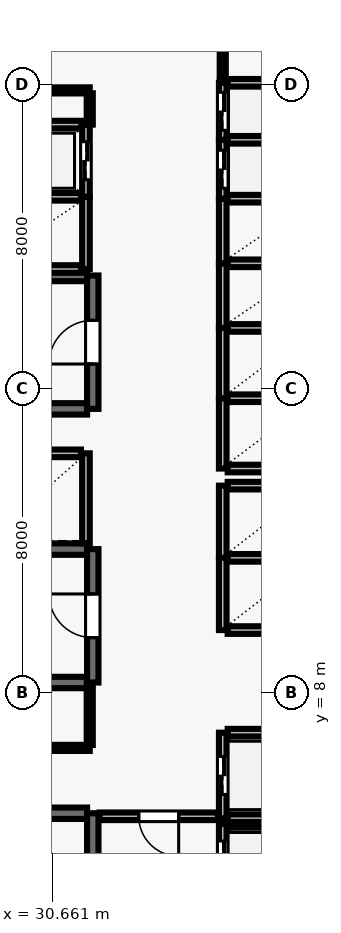
"""IFC4 building model, lengths in metres.
Left out: names, types, materials, properties, quantities, classifications, styles, units other than length and angle.
Written with IfcOpenShell. Run it as: python <this file> out.ifc"""

import sys

from ifc_helpers import new_model, si_unit, direction, frame, frame_2d, origin, place, context, subcontext, project, spatial, rectangle, extrude, element, fill, save


model = new_model("IFC4")
c1 = context("Model", 3, precision=1e-05, world=origin(), true_north=direction((0.0, 1.0)))
c2 = subcontext(c1, "Body", "Model", "MODEL_VIEW")
j1 = project(units=[si_unit("LENGTHUNIT", "METRE"), si_unit("PLANEANGLEUNIT", "RADIAN")], contexts=[c1])
p1 = place(None, origin())
s1 = spatial("IfcSite", under=j1, at=p1, CompositionType="ELEMENT")
p2 = place(p1, origin())
s2 = spatial("IfcBuilding", under=s1, at=p2, CompositionType="ELEMENT")
p3 = place(p2, frame((0.0, 0.0, 10.4)))
s3 = spatial("IfcBuildingStorey", under=s2, at=p3, CompositionType="ELEMENT", Elevation=10.4)
p4 = place(p3, frame((31.58, 4.83, 0.0), z_axis=(0.0, 0.0, 1.0), x_axis=(-1.0, 0.0, 0.0)))
e1 = element("IfcWall", 1, at=p4, inside=s3, PredefinedType="SHEAR", context=c2, shape_type="SweptSolid", body=[
    extrude(rectangle(XDim=8.36, YDim=0.3, at=frame_2d((4.18, 0.0))), origin(), (0.0, 0.0, 1.0), 4.92),
])
p5 = place(p3, frame((31.73, 0.96, 0.0), z_axis=(0.0, 0.0, 1.0), x_axis=(0.0, 1.0, 0.0)))
e2 = element("IfcWall", 2, at=p5, inside=s3, PredefinedType="SHEAR", context=c2, shape_type="SweptSolid", body=[
    extrude(rectangle(XDim=3.87, YDim=0.3, at=frame_2d((1.935, 0.0))), origin(), (0.0, 0.0, 1.0), 4.92),
])
p6 = place(p5, frame((1.54, 0.0, 0.0)))
e3 = element("IfcOpeningElement", 3, at=p6, cuts=e2, PredefinedType="OPENING", context=c2, shape_type="SweptSolid", body=[
    extrude(rectangle(XDim=1.15, YDim=2.15, at=frame_2d((0.575, 1.075))), frame((0.0, 0.16, 0.0), z_axis=(0.0, -1.0, 0.0), x_axis=(1.0, 0.0, 0.0)), (0.0, 0.0, 1.0), 0.32),
])
for number, where, z_axis, x_axis in (
    (4, (31.58, 18.98, 0.0), (0.0, 0.0, 1.0), (-1.0, 0.0, 0.0)),
    (5, (23.22, 15.47, 0.0), (0.0, 0.0, 1.0), (1.0, 0.0, 0.0)),
):
    element("IfcWall", number, at=place(p3, frame(where, z_axis=z_axis, x_axis=x_axis)), inside=s3, PredefinedType="SHEAR", context=c2, shape_type="SweptSolid", body=[
        extrude(rectangle(XDim=8.36, YDim=0.3, at=frame_2d((4.18, 0.0))), origin(), (0.0, 0.0, 1.0), 4.92),
    ])
p7 = place(p3, frame((31.73, 15.47, 0.0), z_axis=(0.0, 0.0, 1.0), x_axis=(0.0, 1.0, 0.0)))
e6 = element("IfcWall", 6, at=p7, inside=s3, PredefinedType="SHEAR", context=c2, shape_type="SweptSolid", body=[
    extrude(rectangle(XDim=3.51, YDim=0.3, at=frame_2d((1.755, 0.0))), origin(), (0.0, 0.0, 1.0), 4.92),
])
p8 = place(p7, frame((1.18, 0.0, 0.0)))
e7 = element("IfcOpeningElement", 7, at=p8, cuts=e6, PredefinedType="OPENING", context=c2, shape_type="SweptSolid", body=[
    extrude(rectangle(XDim=1.15, YDim=2.15, at=frame_2d((0.575, 1.075))), frame((0.0, 0.16, 0.0), z_axis=(0.0, -1.0, 0.0), x_axis=(1.0, 0.0, 0.0)), (0.0, 0.0, 1.0), 0.32),
])
for number, where, z_axis, x_axis in (
    (8, (31.58, 11.78, 0.0), (0.0, 0.0, 1.0), (-1.0, 0.0, 0.0)),
    (9, (23.22, 8.27, 0.0), (0.0, 0.0, 1.0), (1.0, 0.0, 0.0)),
):
    element("IfcWall", number, at=place(p3, frame(where, z_axis=z_axis, x_axis=x_axis)), inside=s3, PredefinedType="SHEAR", context=c2, shape_type="SweptSolid", body=[
        extrude(rectangle(XDim=8.36, YDim=0.3, at=frame_2d((4.18, 0.0))), origin(), (0.0, 0.0, 1.0), 4.92),
    ])
p9 = place(p3, frame((31.73, 8.27, 0.0), z_axis=(0.0, 0.0, 1.0), x_axis=(0.0, 1.0, 0.0)))
e10 = element("IfcWall", 10, at=p9, inside=s3, PredefinedType="SHEAR", context=c2, shape_type="SweptSolid", body=[
    extrude(rectangle(XDim=3.51, YDim=0.3, at=frame_2d((1.755, 0.0))), origin(), (0.0, 0.0, 1.0), 4.92),
])
p10 = place(p9, frame((1.18, 0.0, 0.0)))
e11 = element("IfcOpeningElement", 11, at=p10, cuts=e10, PredefinedType="OPENING", context=c2, shape_type="SweptSolid", body=[
    extrude(rectangle(XDim=1.15, YDim=2.15, at=frame_2d((0.575, 1.075))), frame((0.0, 0.16, 0.0), z_axis=(0.0, -1.0, 0.0), x_axis=(1.0, 0.0, 0.0)), (0.0, 0.0, 1.0), 0.32),
])
p11 = place(p3, frame((35.15, 4.55, 0.0), z_axis=(0.0, 0.0, 1.0), x_axis=(0.0, -1.0, 0.0)))
e12 = element("IfcWall", 12, at=p11, inside=s3, PredefinedType="SOLIDWALL", context=c2, shape_type="SweptSolid", body=[
    extrude(rectangle(XDim=2.1, YDim=0.2, at=frame_2d((1.05, 0.0))), origin(), (0.0, 0.0, 1.0), 4.92),
])
p12 = place(p11, frame((0.45, 0.0, 0.0)))
e13 = element("IfcOpeningElement", 13, at=p12, cuts=e12, PredefinedType="OPENING", context=c2, shape_type="SweptSolid", body=[
    extrude(rectangle(XDim=1.2, YDim=2.15, at=frame_2d((0.6, 1.075))), frame((0.0, 0.11, 0.0), z_axis=(0.0, -1.0, 0.0), x_axis=(1.0, 0.0, 0.0)), (0.0, 0.0, 1.0), 0.22),
])
p13 = place(p3, frame((37.42, 4.55, 0.0), z_axis=(0.0, 0.0, 1.0), x_axis=(-1.0, 0.0, 0.0)))
e14 = element("IfcWall", 14, at=p13, inside=s3, PredefinedType="SOLIDWALL", context=c2, shape_type="SweptSolid", body=[
    extrude(rectangle(XDim=2.14, YDim=0.2, at=frame_2d((1.07, 0.0))), origin(), (0.0, 0.0, 1.0), 4.92),
])
p14 = place(p3, frame((35.15, 6.95, 0.0), z_axis=(0.0, 0.0, 1.0), x_axis=(0.0, -1.0, 0.0)))
e15 = element("IfcWall", 15, at=p14, inside=s3, PredefinedType="SOLIDWALL", context=c2, shape_type="SweptSolid", body=[
    extrude(rectangle(XDim=2.25, YDim=0.2, at=frame_2d((1.125, 0.0))), origin(), (0.0, 0.0, 1.0), 4.92),
])
p15 = place(p14, frame((0.625, 0.0, 0.0)))
e16 = element("IfcOpeningElement", 16, at=p15, cuts=e15, PredefinedType="OPENING", context=c2, shape_type="SweptSolid", body=[
    extrude(rectangle(XDim=1.0, YDim=2.1, at=frame_2d((0.5, 1.05))), frame((0.0, 0.11, 0.0), z_axis=(0.0, -1.0, 0.0), x_axis=(1.0, 0.0, 0.0)), (0.0, 0.0, 1.0), 0.22),
])
for number, where, z_axis, x_axis in (
    (17, (35.28, 4.7, 0.0), (0.0, 0.0, 1.0), (1.0, 0.0, 0.0)),
    (18, (37.42, 6.95, 0.0), (0.0, 0.0, 1.0), (-1.0, 0.0, 0.0)),
):
    element("IfcWall", number, at=place(p3, frame(where, z_axis=z_axis, x_axis=x_axis)), inside=s3, PredefinedType="SOLIDWALL", context=c2, shape_type="SweptSolid", body=[
        extrude(rectangle(XDim=2.14, YDim=0.2, at=frame_2d((1.07, 0.0))), origin(), (0.0, 0.0, 1.0), 4.92),
    ])
p16 = place(p3, frame((35.15, 11.55, 0.0), z_axis=(0.0, 0.0, 1.0), x_axis=(0.0, -1.0, 0.0)))
e19 = element("IfcWall", 19, at=p16, inside=s3, PredefinedType="SOLIDWALL", context=c2, shape_type="SweptSolid", body=[
    extrude(rectangle(XDim=1.9, YDim=0.2, at=frame_2d((0.95, 0.0))), origin(), (0.0, 0.0, 1.0), 4.92),
])
for number, where, z_axis, x_axis in (
    (20, (35.28, 9.65, 0.0), (0.0, 0.0, 1.0), (1.0, 0.0, 0.0)),
    (21, (37.42, 11.55, 0.0), (0.0, 0.0, 1.0), (-1.0, 0.0, 0.0)),
):
    element("IfcWall", number, at=place(p3, frame(where, z_axis=z_axis, x_axis=x_axis)), inside=s3, PredefinedType="SOLIDWALL", context=c2, shape_type="SweptSolid", body=[
        extrude(rectangle(XDim=2.14, YDim=0.2, at=frame_2d((1.07, 0.0))), origin(), (0.0, 0.0, 1.0), 4.92),
    ])
p17 = place(p3, frame((35.15, 13.45, 0.0), z_axis=(0.0, 0.0, 1.0), x_axis=(0.0, -1.0, 0.0)))
e22 = element("IfcWall", 22, at=p17, inside=s3, PredefinedType="SOLIDWALL", context=c2, shape_type="SweptSolid", body=[
    extrude(rectangle(XDim=1.9, YDim=0.2, at=frame_2d((0.95, 0.0))), origin(), (0.0, 0.0, 1.0), 4.92),
])
p18 = place(p3, frame((37.42, 13.45, 0.0), z_axis=(0.0, 0.0, 1.0), x_axis=(-1.0, 0.0, 0.0)))
e23 = element("IfcWall", 23, at=p18, inside=s3, PredefinedType="SOLIDWALL", context=c2, shape_type="SweptSolid", body=[
    extrude(rectangle(XDim=2.14, YDim=0.2, at=frame_2d((1.07, 0.0))), origin(), (0.0, 0.0, 1.0), 4.92),
])
p19 = place(p3, frame((31.55, 11.93, 0.0), z_axis=(0.0, 0.0, 1.0), x_axis=(0.0, 1.0, 0.0)))
e24 = element("IfcWall", 24, at=p19, inside=s3, PredefinedType="SOLIDWALL", context=c2, shape_type="SweptSolid", body=[
    extrude(rectangle(XDim=2.37, YDim=0.2, at=frame_2d((1.185, 0.0))), origin(), (0.0, 0.0, 1.0), 4.92),
])
p20 = place(p3, frame((31.42, 14.3, 0.0), z_axis=(0.0, 0.0, 1.0), x_axis=(-1.0, 0.0, 0.0)))
e25 = element("IfcWall", 25, at=p20, inside=s3, PredefinedType="SOLIDWALL", context=c2, shape_type="SweptSolid", body=[
    extrude(rectangle(XDim=2.44, YDim=0.2, at=frame_2d((1.22, 0.0))), origin(), (0.0, 0.0, 1.0), 4.92),
])
p21 = place(p3, frame((35.15, 15.75, 0.0), z_axis=(0.0, 0.0, 1.0), x_axis=(0.0, -1.0, 0.0)))
e26 = element("IfcWall", 26, at=p21, inside=s3, PredefinedType="SOLIDWALL", context=c2, shape_type="SweptSolid", body=[
    extrude(rectangle(XDim=1.85, YDim=0.2, at=frame_2d((0.925, 0.0))), origin(), (0.0, 0.0, 1.0), 4.92),
])
for number, where, z_axis, x_axis in (
    (27, (35.28, 13.9, 0.0), (0.0, 0.0, 1.0), (1.0, 0.0, 0.0)),
    (28, (37.42, 15.75, 0.0), (0.0, 0.0, 1.0), (-1.0, 0.0, 0.0)),
):
    element("IfcWall", number, at=place(p3, frame(where, z_axis=z_axis, x_axis=x_axis)), inside=s3, PredefinedType="SOLIDWALL", context=c2, shape_type="SweptSolid", body=[
        extrude(rectangle(XDim=2.14, YDim=0.2, at=frame_2d((1.07, 0.0))), origin(), (0.0, 0.0, 1.0), 4.92),
    ])
p22 = place(p3, frame((35.15, 17.6, 0.0), z_axis=(0.0, 0.0, 1.0), x_axis=(0.0, -1.0, 0.0)))
e29 = element("IfcWall", 29, at=p22, inside=s3, PredefinedType="SOLIDWALL", context=c2, shape_type="SweptSolid", body=[
    extrude(rectangle(XDim=1.85, YDim=0.2, at=frame_2d((0.925, 0.0))), origin(), (0.0, 0.0, 1.0), 4.92),
])
p23 = place(p3, frame((37.42, 17.6, 0.0), z_axis=(0.0, 0.0, 1.0), x_axis=(-1.0, 0.0, 0.0)))
e30 = element("IfcWall", 30, at=p23, inside=s3, PredefinedType="SOLIDWALL", context=c2, shape_type="SweptSolid", body=[
    extrude(rectangle(XDim=2.14, YDim=0.2, at=frame_2d((1.07, 0.0))), origin(), (0.0, 0.0, 1.0), 4.92),
])
p24 = place(p3, frame((35.15, 19.3, 0.0), z_axis=(0.0, 0.0, 1.0), x_axis=(0.0, -1.0, 0.0)))
e31 = element("IfcWall", 31, at=p24, inside=s3, PredefinedType="SOLIDWALL", context=c2, shape_type="SweptSolid", body=[
    extrude(rectangle(XDim=1.7, YDim=0.2, at=frame_2d((0.85, 0.0))), origin(), (0.0, 0.0, 1.0), 4.92),
])
p25 = place(p3, frame((37.42, 19.3, 0.0), z_axis=(0.0, 0.0, 1.0), x_axis=(-1.0, 0.0, 0.0)))
e32 = element("IfcWall", 32, at=p25, inside=s3, PredefinedType="SOLIDWALL", context=c2, shape_type="SweptSolid", body=[
    extrude(rectangle(XDim=2.14, YDim=0.2, at=frame_2d((1.07, 0.0))), origin(), (0.0, 0.0, 1.0), 4.92),
])
p26 = place(p3, frame((35.15, 21.0, 0.0), z_axis=(0.0, 0.0, 1.0), x_axis=(0.0, -1.0, 0.0)))
e33 = element("IfcWall", 33, at=p26, inside=s3, PredefinedType="SOLIDWALL", context=c2, shape_type="SweptSolid", body=[
    extrude(rectangle(XDim=1.7, YDim=0.2, at=frame_2d((0.85, 0.0))), origin(), (0.0, 0.0, 1.0), 4.92),
])
p27 = place(p3, frame((37.42, 21.0, 0.0), z_axis=(0.0, 0.0, 1.0), x_axis=(-1.0, 0.0, 0.0)))
e34 = element("IfcWall", 34, at=p27, inside=s3, PredefinedType="SOLIDWALL", context=c2, shape_type="SweptSolid", body=[
    extrude(rectangle(XDim=2.14, YDim=0.2, at=frame_2d((1.07, 0.0))), origin(), (0.0, 0.0, 1.0), 4.92),
])
p28 = place(p3, frame((31.55, 19.15, 0.0), z_axis=(0.0, 0.0, 1.0), x_axis=(0.0, 1.0, 0.0)))
e35 = element("IfcWall", 35, at=p28, inside=s3, PredefinedType="SOLIDWALL", context=c2, shape_type="SweptSolid", body=[
    extrude(rectangle(XDim=1.9, YDim=0.2, at=frame_2d((0.95, 0.0))), origin(), (0.0, 0.0, 1.0), 4.92),
])
for number, where, z_axis, x_axis in (
    (36, (28.98, 19.15, 0.0), (0.0, 0.0, 1.0), (1.0, 0.0, 0.0)),
    (37, (31.42, 21.05, 0.0), (0.0, 0.0, 1.0), (-1.0, 0.0, 0.0)),
):
    element("IfcWall", number, at=place(p3, frame(where, z_axis=z_axis, x_axis=x_axis)), inside=s3, PredefinedType="SOLIDWALL", context=c2, shape_type="SweptSolid", body=[
        extrude(rectangle(XDim=2.44, YDim=0.2, at=frame_2d((1.22, 0.0))), origin(), (0.0, 0.0, 1.0), 4.92),
    ])
p29 = place(p3, frame((35.15, 22.55, 0.0), z_axis=(0.0, 0.0, 1.0), x_axis=(0.0, -1.0, 0.0)))
e38 = element("IfcWall", 38, at=p29, inside=s3, PredefinedType="SOLIDWALL", context=c2, shape_type="SweptSolid", body=[
    extrude(rectangle(XDim=1.55, YDim=0.2, at=frame_2d((0.775, 0.0))), origin(), (0.0, 0.0, 1.0), 4.92),
])
p30 = place(p29, frame((0.275, 0.0, 0.0)))
e39 = element("IfcOpeningElement", 39, at=p30, cuts=e38, PredefinedType="OPENING", context=c2, shape_type="SweptSolid", body=[
    extrude(rectangle(XDim=1.0, YDim=2.1, at=frame_2d((0.5, 1.05))), frame((0.0, 0.11, 0.0), z_axis=(0.0, -1.0, 0.0), x_axis=(1.0, 0.0, 0.0)), (0.0, 0.0, 1.0), 0.22),
])
p31 = place(p3, frame((37.42, 22.55, 0.0), z_axis=(0.0, 0.0, 1.0), x_axis=(-1.0, 0.0, 0.0)))
e40 = element("IfcWall", 40, at=p31, inside=s3, PredefinedType="SOLIDWALL", context=c2, shape_type="SweptSolid", body=[
    extrude(rectangle(XDim=2.14, YDim=0.2, at=frame_2d((1.07, 0.0))), origin(), (0.0, 0.0, 1.0), 4.92),
])
p32 = place(p3, frame((35.15, 24.05, 0.0), z_axis=(0.0, 0.0, 1.0), x_axis=(0.0, -1.0, 0.0)))
e41 = element("IfcWall", 41, at=p32, inside=s3, PredefinedType="SOLIDWALL", context=c2, shape_type="SweptSolid", body=[
    extrude(rectangle(XDim=1.5, YDim=0.2, at=frame_2d((0.75, 0.0))), origin(), (0.0, 0.0, 1.0), 4.92),
])
p33 = place(p32, frame((0.25, 0.0, 0.0)))
e42 = element("IfcOpeningElement", 42, at=p33, cuts=e41, PredefinedType="OPENING", context=c2, shape_type="SweptSolid", body=[
    extrude(rectangle(XDim=1.0, YDim=2.1, at=frame_2d((0.5, 1.05))), frame((0.0, 0.11, 0.0), z_axis=(0.0, -1.0, 0.0), x_axis=(1.0, 0.0, 0.0)), (0.0, 0.0, 1.0), 0.22),
])
p34 = place(p3, frame((37.42, 24.05, 0.0), z_axis=(0.0, 0.0, 1.0), x_axis=(-1.0, 0.0, 0.0)))
e43 = element("IfcWall", 43, at=p34, inside=s3, PredefinedType="SOLIDWALL", context=c2, shape_type="SweptSolid", body=[
    extrude(rectangle(XDim=2.14, YDim=0.2, at=frame_2d((1.07, 0.0))), origin(), (0.0, 0.0, 1.0), 4.92),
])
p35 = place(p3, frame((31.55, 21.05, 0.0), z_axis=(0.0, 0.0, 1.0), x_axis=(0.0, 1.0, 0.0)))
e44 = element("IfcWall", 44, at=p35, inside=s3, PredefinedType="SOLIDWALL", context=c2, shape_type="SweptSolid", body=[
    extrude(rectangle(XDim=1.9, YDim=0.2, at=frame_2d((0.95, 0.0))), origin(), (0.0, 0.0, 1.0), 4.92),
])
p36 = place(p35, frame((0.45, 0.0, 0.0)))
e45 = element("IfcOpeningElement", 45, at=p36, cuts=e44, PredefinedType="OPENING", context=c2, shape_type="SweptSolid", body=[
    extrude(rectangle(XDim=1.0, YDim=2.1, at=frame_2d((0.5, 1.05))), frame((0.0, 0.11, 0.0), z_axis=(0.0, -1.0, 0.0), x_axis=(1.0, 0.0, 0.0)), (0.0, 0.0, 1.0), 0.22),
])
p37 = place(p3, frame((31.43, 22.95, 0.0), z_axis=(0.0, 0.0, 1.0), x_axis=(-1.0, 0.0, 0.0)))
e46 = element("IfcWall", 46, at=p37, inside=s3, PredefinedType="SOLIDWALL", context=c2, shape_type="SweptSolid", body=[
    extrude(rectangle(XDim=2.46, YDim=0.2, at=frame_2d((1.23, 0.0))), origin(), (0.0, 0.0, 1.0), 4.92),
])
p38 = place(p3, frame((28.8, 23.85, 0.0), z_axis=(0.0, 0.0, 1.0), x_axis=(1.0, 0.0, 0.0)))
e47 = element("IfcWall", 47, at=p38, inside=s3, PredefinedType="PARTITIONING", context=c2, shape_type="SweptSolid", body=[
    extrude(rectangle(XDim=2.85, YDim=0.16, at=frame_2d((1.425, 0.0))), origin(), (0.0, 0.0, 1.0), 4.92),
])
p39 = place(p3, frame((31.65, 6.55, 0.0), z_axis=(0.0, 0.0, 1.0), x_axis=(-1.0, 0.0, 0.0)))
e48 = element("IfcWall", 48, at=p39, inside=s3, PredefinedType="PARTITIONING", context=c2, shape_type="SweptSolid", body=[
    extrude(rectangle(XDim=4.75, YDim=0.16, at=frame_2d((2.375, 0.0))), origin(), (0.0, 0.0, 1.0), 4.92),
])
p40 = place(p39, frame((1.935, 0.0, 0.0)))
e49 = element("IfcOpeningElement", 49, at=p40, cuts=e48, PredefinedType="OPENING", context=c2, shape_type="SweptSolid", body=[
    extrude(rectangle(XDim=0.88, YDim=2.1, at=frame_2d((0.44, 1.05))), frame((0.0, 0.09, 0.0), z_axis=(0.0, -1.0, 0.0), x_axis=(1.0, 0.0, 0.0)), (0.0, 0.0, 1.0), 0.18),
])
p41 = place(p3, frame((35.02, 4.75, 0.0), z_axis=(0.0, 0.0, 1.0), x_axis=(-1.0, 0.0, 0.0)))
e50 = element("IfcWall", 50, at=p41, inside=s3, PredefinedType="SOLIDWALL", context=c2, shape_type="SweptSolid", body=[
    extrude(rectangle(XDim=3.11, YDim=0.2, at=frame_2d((1.555, 0.0))), origin(), (0.0, 0.0, 1.0), 4.92),
])
p42 = place(p41, frame((1.03, 0.0, 0.0)))
e51 = element("IfcOpeningElement", 51, at=p42, cuts=e50, PredefinedType="OPENING", context=c2, shape_type="SweptSolid", body=[
    extrude(rectangle(XDim=1.05, YDim=2.15, at=frame_2d((0.525, 1.075))), frame((0.0, 0.11, 0.0), z_axis=(0.0, -1.0, 0.0), x_axis=(1.0, 0.0, 0.0)), (0.0, 0.0, 1.0), 0.22),
])
p43 = place(p3, frame((31.65, 8.24, 0.0), z_axis=(0.0, 0.0, 1.0), x_axis=(0.0, -1.0, 0.0)))
e52 = element("IfcWall", 52, at=p43, inside=s3, PredefinedType="PARTITIONING", context=c2, shape_type="SweptSolid", body=[
    extrude(rectangle(XDim=1.615, YDim=0.16, at=frame_2d((0.808, 0.0))), origin(), (0.0, 0.0, 1.0), 4.92),
])
p44 = place(p3, frame((31.65, 23.775, 0.0), z_axis=(0.0, 0.0, 1.0), x_axis=(0.0, -1.0, 0.0)))
e53 = element("IfcWall", 53, at=p44, inside=s3, PredefinedType="PARTITIONING", context=c2, shape_type="SweptSolid", body=[
    extrude(rectangle(XDim=0.825, YDim=0.16, at=frame_2d((0.413, 0.0))), origin(), (0.0, 0.0, 1.0), 4.92),
])
p45 = place(p3, frame((35.15, 24.07, 0.0), z_axis=(0.0, 0.0, 1.0), x_axis=(0.0, 1.0, 0.0)))
e54 = element("IfcWall", 54, at=p45, inside=s3, PredefinedType="PARTITIONING", context=c2, shape_type="SweptSolid", body=[
    extrude(rectangle(XDim=1.855, YDim=0.16, at=frame_2d((0.927, 0.0))), origin(), (0.0, 0.0, 1.0), 4.92),
])
p46 = place(p8, origin())
e55 = element("IfcDoor", 55, at=p46, inside=s3, OperationType="SINGLE_SWING_LEFT", PredefinedType="DOOR", context=c2, shape_type="SweptSolid", body=[
    extrude(rectangle(XDim=1.15, YDim=2.15, at=frame_2d((0.575, 1.075))), frame((0.0, 0.025, 0.0), z_axis=(0.0, -1.0, 0.0), x_axis=(1.0, 0.0, 0.0)), (0.0, 0.0, 1.0), 0.05),
])
fill(e7, e55)
p47 = place(p10, origin())
e56 = element("IfcDoor", 56, at=p47, inside=s3, OperationType="SINGLE_SWING_RIGHT", PredefinedType="DOOR", context=c2, shape_type="SweptSolid", body=[
    extrude(rectangle(XDim=1.15, YDim=2.15, at=frame_2d((0.575, 1.075))), frame((0.0, 0.025, 0.0), z_axis=(0.0, -1.0, 0.0), x_axis=(1.0, 0.0, 0.0)), (0.0, 0.0, 1.0), 0.05),
])
fill(e11, e56)
p48 = place(p12, origin())
e57 = element("IfcDoor", 57, at=p48, inside=s3, OperationType="DOUBLE_DOOR_SLIDING", PredefinedType="DOOR", context=c2, shape_type="SweptSolid", body=[
    extrude(rectangle(XDim=1.2, YDim=2.15, at=frame_2d((0.6, 1.075))), frame((0.0, 0.025, 0.0), z_axis=(0.0, -1.0, 0.0), x_axis=(1.0, 0.0, 0.0)), (0.0, 0.0, 1.0), 0.05),
])
fill(e13, e57)
p49 = place(p15, origin())
e58 = element("IfcDoor", 58, at=p49, inside=s3, OperationType="DOUBLE_DOOR_SLIDING", PredefinedType="DOOR", context=c2, shape_type="SweptSolid", body=[
    extrude(rectangle(XDim=1.0, YDim=2.1, at=frame_2d((0.5, 1.05))), frame((0.0, 0.025, 0.0), z_axis=(0.0, -1.0, 0.0), x_axis=(1.0, 0.0, 0.0)), (0.0, 0.0, 1.0), 0.05),
])
fill(e16, e58)
p50 = place(p30, origin())
e59 = element("IfcDoor", 59, at=p50, inside=s3, OperationType="DOUBLE_DOOR_SLIDING", PredefinedType="DOOR", context=c2, shape_type="SweptSolid", body=[
    extrude(rectangle(XDim=1.0, YDim=2.1, at=frame_2d((0.5, 1.05))), frame((0.0, 0.025, 0.0), z_axis=(0.0, -1.0, 0.0), x_axis=(1.0, 0.0, 0.0)), (0.0, 0.0, 1.0), 0.05),
])
fill(e39, e59)
p51 = place(p33, origin())
e60 = element("IfcDoor", 60, at=p51, inside=s3, OperationType="DOUBLE_DOOR_SLIDING", PredefinedType="DOOR", context=c2, shape_type="SweptSolid", body=[
    extrude(rectangle(XDim=1.0, YDim=2.1, at=frame_2d((0.5, 1.05))), frame((0.0, 0.025, 0.0), z_axis=(0.0, -1.0, 0.0), x_axis=(1.0, 0.0, 0.0)), (0.0, 0.0, 1.0), 0.05),
])
fill(e42, e60)
p52 = place(p36, origin())
e61 = element("IfcDoor", 61, at=p52, inside=s3, OperationType="DOUBLE_DOOR_SLIDING", PredefinedType="DOOR", context=c2, shape_type="SweptSolid", body=[
    extrude(rectangle(XDim=1.0, YDim=2.1, at=frame_2d((0.5, 1.05))), frame((0.0, 0.025, 0.0), z_axis=(0.0, -1.0, 0.0), x_axis=(1.0, 0.0, 0.0)), (0.0, 0.0, 1.0), 0.05),
])
fill(e45, e61)
p53 = place(p42, origin())
e62 = element("IfcDoor", 62, at=p53, inside=s3, OperationType="SINGLE_SWING_LEFT", PredefinedType="DOOR", context=c2, shape_type="SweptSolid", body=[
    extrude(rectangle(XDim=1.05, YDim=2.15, at=frame_2d((0.525, 1.075))), frame((0.0, 0.025, 0.0), z_axis=(0.0, -1.0, 0.0), x_axis=(1.0, 0.0, 0.0)), (0.0, 0.0, 1.0), 0.05),
])
fill(e51, e62)
save(model, sys.argv[1])
